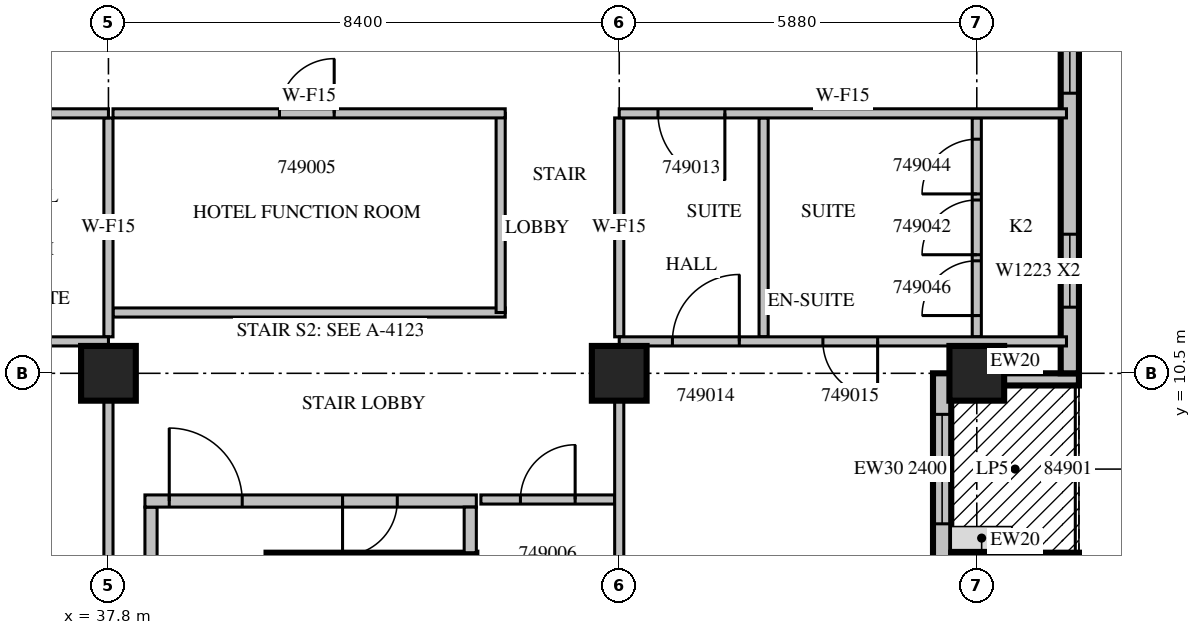
"""IFC4 building model, lengths in metres.
Left out: names, types, materials, properties, quantities, classifications, styles, units other than length and angle.
Written with IfcOpenShell. Run it as: python <this file> out.ifc"""

import sys

from ifc_helpers import new_model, si_unit, direction, frame, frame_2d, origin, origin_2d, place, context, subcontext, project, spatial, rectangle, extrude, source, transform, mapped, element, fill, save


model = new_model("IFC4")
c1 = context("Model", 3, precision=1e-05, world=origin(), true_north=direction((0.0, 1.0)))
c2 = subcontext(c1, "Body", "Model", "MODEL_VIEW")
j1 = project(units=[si_unit("LENGTHUNIT", "METRE"), si_unit("PLANEANGLEUNIT", "RADIAN")], contexts=[c1])
p1 = place(None, origin())
s1 = spatial("IfcSite", under=j1, at=p1, CompositionType="ELEMENT")
p2 = place(p1, origin())
s2 = spatial("IfcBuilding", under=s1, at=p2, CompositionType="ELEMENT")
p3 = place(p2, frame((0.0, 0.0, 219.6)))
s3 = spatial("IfcBuildingStorey", under=s2, at=p3, CompositionType="ELEMENT", Elevation=219.6)
m1 = source(origin(), c2, "Body", "SweptSolid", [
    extrude(rectangle(XDim=0.9, YDim=0.9, at=origin_2d()), origin(), (0.0, 0.0, 1.0), 3.8),
])
for number, where, z_axis, x_axis in (
    (1, (37.8, 10.5, 0.0), (0.0, 0.0, 1.0), (1.0, 0.0, 0.0)),
    (2, (46.2, 10.5, 0.0), (0.0, 0.0, 1.0), (1.0, 0.0, 0.0)),
    (3, (52.08, 10.5, 0.0), (0.0, 0.0, 1.0), (1.0, 0.0, 0.0)),
):
    element("IfcColumn", number, at=place(p3, frame(where, z_axis=z_axis, x_axis=x_axis)), inside=s3, PredefinedType="COLUMN", context=c2, shape_type="MappedRepresentation", body=[
        mapped(m1, transform((0.0, 0.0, 0.0), scale=1.0)),
    ])
p4 = place(p3, frame((51.51, 7.35, 0.0), z_axis=(0.0, 0.0, 1.0), x_axis=(0.0, 1.0, 0.0)))
e4 = element("IfcWall", 4, at=p4, inside=s3, PredefinedType="STANDARD", context=c2, shape_type="SweptSolid", body=[
    extrude(rectangle(XDim=3.15, YDim=0.3, at=frame_2d((1.575, 0.0))), origin(), (0.0, 0.0, 1.0), 2.4),
])
m2 = source(origin(), c2, "Body", "SweptSolid", [
    extrude(rectangle(XDim=1.8, YDim=2.4, at=frame_2d((0.9, 1.2))), frame((0.0, 0.16, 0.0), z_axis=(0.0, -1.0, 0.0), x_axis=(1.0, 0.0, 0.0)), (0.0, 0.0, 1.0), 0.32),
])
p5 = place(p4, frame((0.675, 0.0, 0.0)))
e5 = element("IfcOpeningElement", 5, at=p5, cuts=e4, PredefinedType="OPENING", context=c2, shape_type="MappedRepresentation", body=[
    mapped(m2, transform((0.0, 0.0, 0.0), scale=1.0)),
])
m3 = source(origin(), c2, "Body", "SweptSolid", [
    extrude(rectangle(XDim=2.1, YDim=0.2, at=frame_2d((1.05, 0.0))), origin(), (0.0, 0.0, 1.0), 3.4),
])
for number, where, z_axis, x_axis in (
    (6, (53.76, 7.45, 0.0), (0.0, 0.0, 1.0), (-1.0, 0.0, 0.0)),
    (7, (53.76, 10.4, 0.0), (0.0, 0.0, 1.0), (-1.0, 0.0, 0.0)),
):
    element("IfcWall", number, at=place(p3, frame(where, z_axis=z_axis, x_axis=x_axis)), inside=s3, PredefinedType="STANDARD", context=c2, shape_type="MappedRepresentation", body=[
        mapped(m3, transform((0.0, 0.0, 0.0), scale=1.0)),
    ])
m4 = source(origin(), c2, "Body", "SweptSolid", [
    extrude(rectangle(XDim=6.75, YDim=0.3, at=frame_2d((3.375, 0.0))), origin(), (0.0, 0.0, 1.0), 3.4),
])
p6 = place(p3, frame((53.61, 10.5, 0.0), z_axis=(0.0, 0.0, 1.0), x_axis=(0.0, 1.0, 0.0)))
e8 = element("IfcWall", 8, at=p6, inside=s3, PredefinedType="STANDARD", context=c2, shape_type="MappedRepresentation", body=[
    mapped(m4, transform((0.0, 0.0, 0.0), scale=1.0)),
])
m5 = source(origin(), c2, "Body", "SweptSolid", [
    extrude(rectangle(XDim=1.2, YDim=2.3, at=frame_2d((0.6, 1.15))), frame((0.0, 0.16, 0.0), z_axis=(0.0, -1.0, 0.0), x_axis=(1.0, 0.0, 0.0)), (0.0, 0.0, 1.0), 0.32),
])
p7 = place(p6, frame((1.087, 0.0, 0.6)))
e9 = element("IfcOpeningElement", 9, at=p7, cuts=e8, PredefinedType="OPENING", context=c2, shape_type="MappedRepresentation", body=[
    mapped(m5, transform((0.0, 0.0, 0.0), scale=1.0)),
])
p8 = place(p6, frame((4.606, 0.0, 0.6)))
e10 = element("IfcOpeningElement", 10, at=p8, cuts=e8, PredefinedType="OPENING", context=c2, shape_type="MappedRepresentation", body=[
    mapped(m5, transform((0.0, 0.0, 0.0), scale=1.0)),
])
m6 = source(origin(), c2, "Body", "SweptSolid", [
    extrude(rectangle(XDim=3.45, YDim=0.25, at=frame_2d((1.725, 0.0))), origin(), (0.0, 0.0, 1.0), 3.4),
])
p9 = place(p3, frame((40.4, 7.425, 0.0), z_axis=(0.0, 0.0, 1.0), x_axis=(1.0, 0.0, 0.0)))
e11 = element("IfcWall", 11, at=p9, inside=s3, PredefinedType="SOLIDWALL", context=c2, shape_type="MappedRepresentation", body=[
    mapped(m6, transform((0.0, 0.0, 0.0), scale=1.0)),
])
m7 = source(origin(), c2, "Body", "SweptSolid", [
    extrude(rectangle(XDim=8.0, YDim=0.2, at=frame_2d((4.0, 0.0))), origin(), (0.0, 0.0, 1.0), 3.4),
])
p10 = place(p3, frame((38.5, 0.3, 0.0), z_axis=(0.0, 0.0, 1.0), x_axis=(0.0, 1.0, 0.0)))
e12 = element("IfcWall", 12, at=p10, inside=s3, PredefinedType="PARTITIONING", context=c2, shape_type="MappedRepresentation", body=[
    mapped(m7, transform((0.0, 0.0, 0.0), scale=1.0)),
])
m8 = source(origin(), c2, "Body", "SweptSolid", [
    extrude(rectangle(XDim=5.45, YDim=0.2, at=frame_2d((2.725, 0.0))), origin(), (0.0, 0.0, 1.0), 3.4),
])
p11 = place(p3, frame((38.4, 8.4, 0.0), z_axis=(0.0, 0.0, 1.0), x_axis=(1.0, 0.0, 0.0)))
e13 = element("IfcWall", 13, at=p11, inside=s3, PredefinedType="PARTITIONING", context=c2, shape_type="MappedRepresentation", body=[
    mapped(m8, transform((0.0, 0.0, 0.0), scale=1.0)),
])
m9 = source(origin(), c2, "Body", "SweptSolid", [
    extrude(rectangle(XDim=1.2, YDim=2.1, at=frame_2d((0.6, 1.05))), frame((0.0, 0.11, 0.0), z_axis=(0.0, -1.0, 0.0), x_axis=(1.0, 0.0, 0.0)), (0.0, 0.0, 1.0), 0.22),
])
p12 = place(p11, frame((0.4, 0.0, 0.0)))
e14 = element("IfcOpeningElement", 14, at=p12, cuts=e13, PredefinedType="OPENING", context=c2, shape_type="MappedRepresentation", body=[
    mapped(m9, transform((0.0, 0.0, 0.0), scale=1.0)),
])
m10 = source(origin(), c2, "Body", "SweptSolid", [
    extrude(rectangle(XDim=0.9, YDim=2.1, at=frame_2d((0.45, 1.05))), frame((0.0, 0.11, 0.0), z_axis=(0.0, -1.0, 0.0), x_axis=(1.0, 0.0, 0.0)), (0.0, 0.0, 1.0), 0.22),
])
p13 = place(p11, frame((3.25, 0.0, 0.0)))
e15 = element("IfcOpeningElement", 15, at=p13, cuts=e13, PredefinedType="OPENING", context=c2, shape_type="MappedRepresentation", body=[
    mapped(m10, transform((0.0, 0.0, 0.0), scale=1.0)),
])
m11 = source(origin(), c2, "Body", "SweptSolid", [
    extrude(rectangle(XDim=0.75, YDim=0.2, at=frame_2d((0.375, 0.0))), origin(), (0.0, 0.0, 1.0), 3.4),
])
p14 = place(p3, frame((43.75, 7.55, 0.0), z_axis=(0.0, 0.0, 1.0), x_axis=(0.0, 1.0, 0.0)))
e16 = element("IfcWall", 16, at=p14, inside=s3, PredefinedType="PARTITIONING", context=c2, shape_type="MappedRepresentation", body=[
    mapped(m11, transform((0.0, 0.0, 0.0), scale=1.0)),
])
m12 = source(origin(), c2, "Body", "SweptSolid", [
    extrude(rectangle(XDim=6.45, YDim=0.15, at=frame_2d((3.225, 0.0))), origin(), (0.0, 0.0, 1.0), 3.4),
])
p15 = place(p3, frame((37.875, 11.5, 0.0), z_axis=(0.0, 0.0, 1.0), x_axis=(1.0, 0.0, 0.0)))
e17 = element("IfcWall", 17, at=p15, inside=s3, PredefinedType="PARTITIONING", context=c2, shape_type="MappedRepresentation", body=[
    mapped(m12, transform((0.0, 0.0, 0.0), scale=1.0)),
])
m13 = source(origin(), c2, "Body", "SweptSolid", [
    extrude(rectangle(XDim=3.275, YDim=0.15, at=frame_2d((1.637, 0.0))), origin(), (0.0, 0.0, 1.0), 3.4),
])
p16 = place(p3, frame((44.25, 11.5, 0.0), z_axis=(0.0, 0.0, 1.0), x_axis=(0.0, 1.0, 0.0)))
e18 = element("IfcWall", 18, at=p16, inside=s3, PredefinedType="PARTITIONING", context=c2, shape_type="MappedRepresentation", body=[
    mapped(m13, transform((0.0, 0.0, 0.0), scale=1.0)),
])
p17 = place(p3, frame((44.325, 14.775, 0.0), z_axis=(0.0, 0.0, 1.0), x_axis=(-1.0, 0.0, 0.0)))
e19 = element("IfcWall", 19, at=p17, inside=s3, PredefinedType="PARTITIONING", context=c2, shape_type="MappedRepresentation", body=[
    mapped(m12, transform((0.0, 0.0, 0.0), scale=1.0)),
])
m14 = source(origin(), c2, "Body", "SweptSolid", [
    extrude(rectangle(XDim=0.9, YDim=2.1, at=frame_2d((0.45, 1.05))), frame((0.0, 0.085, 0.0), z_axis=(0.0, -1.0, 0.0), x_axis=(1.0, 0.0, 0.0)), (0.0, 0.0, 1.0), 0.17),
])
p18 = place(p17, frame((2.812, 0.0, 0.0)))
e20 = element("IfcOpeningElement", 20, at=p18, cuts=e19, PredefinedType="OPENING", context=c2, shape_type="MappedRepresentation", body=[
    mapped(m14, transform((0.0, 0.0, 0.0), scale=1.0)),
])
m15 = source(origin(), c2, "Body", "SweptSolid", [
    extrude(rectangle(XDim=2.2, YDim=0.15, at=frame_2d((1.1, 0.0))), origin(), (0.0, 0.0, 1.0), 3.4),
])
p19 = place(p3, frame((46.125, 8.425, 0.0), z_axis=(0.0, 0.0, 1.0), x_axis=(-1.0, 0.0, 0.0)))
e21 = element("IfcWall", 21, at=p19, inside=s3, PredefinedType="PARTITIONING", context=c2, shape_type="MappedRepresentation", body=[
    mapped(m15, transform((0.0, 0.0, 0.0), scale=1.0)),
])
p20 = place(p19, frame((0.65, 0.0, 0.0)))
e22 = element("IfcOpeningElement", 22, at=p20, cuts=e21, PredefinedType="OPENING", context=c2, shape_type="MappedRepresentation", body=[
    mapped(m14, transform((0.0, 0.0, 0.0), scale=1.0)),
])
m16 = source(origin(), c2, "Body", "SweptSolid", [
    extrude(rectangle(XDim=9.152, YDim=0.15, at=frame_2d((4.576, 0.0))), origin(), (0.0, 0.0, 1.0), 3.4),
])
p21 = place(p3, frame((37.8, 0.899, 0.0), z_axis=(0.0, 0.0, 1.0), x_axis=(0.0, 1.0, 0.0)))
e23 = element("IfcWall", 23, at=p21, inside=s3, PredefinedType="PARTITIONING", context=c2, shape_type="MappedRepresentation", body=[
    mapped(m16, transform((0.0, 0.0, 0.0), scale=1.0)),
])
m17 = source(origin(), c2, "Body", "SweptSolid", [
    extrude(rectangle(XDim=3.6, YDim=0.15, at=frame_2d((1.8, 0.0))), origin(), (0.0, 0.0, 1.0), 3.4),
])
p22 = place(p3, frame((37.8, 11.1, 0.0), z_axis=(0.0, 0.0, 1.0), x_axis=(0.0, 1.0, 0.0)))
e24 = element("IfcWall", 24, at=p22, inside=s3, PredefinedType="PARTITIONING", context=c2, shape_type="MappedRepresentation", body=[
    mapped(m17, transform((0.0, 0.0, 0.0), scale=1.0)),
])
m18 = source(origin(), c2, "Body", "SweptSolid", [
    extrude(rectangle(XDim=8.4, YDim=0.15, at=frame_2d((4.2, 0.0))), origin(), (0.0, 0.0, 1.0), 3.4),
])
p23 = place(p3, frame((37.8, 11.025, 0.0), z_axis=(0.0, 0.0, 1.0), x_axis=(-1.0, 0.0, 0.0)))
e25 = element("IfcWall", 25, at=p23, inside=s3, PredefinedType="PARTITIONING", context=c2, shape_type="MappedRepresentation", body=[
    mapped(m18, transform((0.0, 0.0, 0.0), scale=1.0)),
])
p24 = place(p23, frame((7.025, 0.0, 0.0)))
e26 = element("IfcOpeningElement", 26, at=p24, cuts=e25, PredefinedType="OPENING", context=c2, shape_type="MappedRepresentation", body=[
    mapped(m14, transform((0.0, 0.0, 0.0), scale=1.0)),
])
p25 = place(p23, frame((5.013, 0.0, 0.0)))
e27 = element("IfcOpeningElement", 27, at=p25, cuts=e25, PredefinedType="OPENING", context=c2, shape_type="MappedRepresentation", body=[
    mapped(m14, transform((0.0, 0.0, 0.0), scale=1.0)),
])
m19 = source(origin(), c2, "Body", "SweptSolid", [
    extrude(rectangle(XDim=1.0, YDim=2.1, at=frame_2d((0.5, 1.05))), frame((0.0, 0.085, 0.0), z_axis=(0.0, -1.0, 0.0), x_axis=(1.0, 0.0, 0.0)), (0.0, 0.0, 1.0), 0.17),
])
p26 = place(p23, frame((2.9, 0.0, 0.0)))
e28 = element("IfcOpeningElement", 28, at=p26, cuts=e25, PredefinedType="OPENING", context=c2, shape_type="MappedRepresentation", body=[
    mapped(m19, transform((0.0, 0.0, 0.0), scale=1.0)),
])
p27 = place(p23, frame((1.087, 0.0, 0.0)))
e29 = element("IfcOpeningElement", 29, at=p27, cuts=e25, PredefinedType="OPENING", context=c2, shape_type="MappedRepresentation", body=[
    mapped(m14, transform((0.0, 0.0, 0.0), scale=1.0)),
])
p28 = place(p3, frame((48.574, 11.1, 0.0), z_axis=(0.0, 0.0, 1.0), x_axis=(0.0, 1.0, 0.0)))
e30 = element("IfcWall", 30, at=p28, inside=s3, PredefinedType="PARTITIONING", context=c2, shape_type="MappedRepresentation", body=[
    mapped(m17, transform((0.0, 0.0, 0.0), scale=1.0)),
])
p29 = place(p3, frame((52.08, 11.1, 0.0), z_axis=(0.0, 0.0, 1.0), x_axis=(0.0, 1.0, 0.0)))
e31 = element("IfcWall", 31, at=p29, inside=s3, PredefinedType="PARTITIONING", context=c2, shape_type="MappedRepresentation", body=[
    mapped(m17, transform((0.0, 0.0, 0.0), scale=1.0)),
])
p30 = place(p29, frame((1.35, 0.0, 0.0)))
e32 = element("IfcOpeningElement", 32, at=p30, cuts=e31, PredefinedType="OPENING", context=c2, shape_type="MappedRepresentation", body=[
    mapped(m14, transform((0.0, 0.0, 0.0), scale=1.0)),
])
p31 = place(p29, frame((2.35, 0.0, 0.0)))
e33 = element("IfcOpeningElement", 33, at=p31, cuts=e31, PredefinedType="OPENING", context=c2, shape_type="MappedRepresentation", body=[
    mapped(m14, transform((0.0, 0.0, 0.0), scale=1.0)),
])
p32 = place(p29, frame((0.35, 0.0, 0.0)))
e34 = element("IfcOpeningElement", 34, at=p32, cuts=e31, PredefinedType="OPENING", context=c2, shape_type="MappedRepresentation", body=[
    mapped(m14, transform((0.0, 0.0, 0.0), scale=1.0)),
])
p33 = place(p3, frame((46.2, 0.899, 0.0), z_axis=(0.0, 0.0, 1.0), x_axis=(0.0, 1.0, 0.0)))
e35 = element("IfcWall", 35, at=p33, inside=s3, PredefinedType="PARTITIONING", context=c2, shape_type="MappedRepresentation", body=[
    mapped(m16, transform((0.0, 0.0, 0.0), scale=1.0)),
])
p34 = place(p3, frame((46.2, 11.1, 0.0), z_axis=(0.0, 0.0, 1.0), x_axis=(0.0, 1.0, 0.0)))
e36 = element("IfcWall", 36, at=p34, inside=s3, PredefinedType="PARTITIONING", context=c2, shape_type="MappedRepresentation", body=[
    mapped(m17, transform((0.0, 0.0, 0.0), scale=1.0)),
])
m20 = source(origin(), c2, "Body", "SweptSolid", [
    extrude(rectangle(XDim=7.355, YDim=0.15, at=frame_2d((3.678, 0.0))), origin(), (0.0, 0.0, 1.0), 3.4),
])
p35 = place(p3, frame((53.555, 11.025, 0.0), z_axis=(0.0, 0.0, 1.0), x_axis=(-1.0, 0.0, 0.0)))
e37 = element("IfcWall", 37, at=p35, inside=s3, PredefinedType="PARTITIONING", context=c2, shape_type="MappedRepresentation", body=[
    mapped(m20, transform((0.0, 0.0, 0.0), scale=1.0)),
])
m21 = source(origin(), c2, "Body", "SweptSolid", [
    extrude(rectangle(XDim=1.1, YDim=2.1, at=frame_2d((0.55, 1.05))), frame((0.0, 0.085, 0.0), z_axis=(0.0, -1.0, 0.0), x_axis=(1.0, 0.0, 0.0)), (0.0, 0.0, 1.0), 0.17),
])
p36 = place(p35, frame((5.38, 0.0, 0.0)))
e38 = element("IfcOpeningElement", 38, at=p36, cuts=e37, PredefinedType="OPENING", context=c2, shape_type="MappedRepresentation", body=[
    mapped(m21, transform((0.0, 0.0, 0.0), scale=1.0)),
])
p37 = place(p35, frame((3.106, 0.0, 0.0)))
e39 = element("IfcOpeningElement", 39, at=p37, cuts=e37, PredefinedType="OPENING", context=c2, shape_type="MappedRepresentation", body=[
    mapped(m14, transform((0.0, 0.0, 0.0), scale=1.0)),
])
p38 = place(p3, frame((37.8, 14.775, 0.0), z_axis=(0.0, 0.0, 1.0), x_axis=(-1.0, 0.0, 0.0)))
e40 = element("IfcWall", 40, at=p38, inside=s3, PredefinedType="PARTITIONING", context=c2, shape_type="MappedRepresentation", body=[
    mapped(m18, transform((0.0, 0.0, 0.0), scale=1.0)),
])
p39 = place(p38, frame((7.112, 0.0, 0.0)))
e41 = element("IfcOpeningElement", 41, at=p39, cuts=e40, PredefinedType="OPENING", context=c2, shape_type="MappedRepresentation", body=[
    mapped(m19, transform((0.0, 0.0, 0.0), scale=1.0)),
])
p40 = place(p38, frame((2.95, 0.0, 0.0)))
e42 = element("IfcOpeningElement", 42, at=p40, cuts=e40, PredefinedType="OPENING", context=c2, shape_type="MappedRepresentation", body=[
    mapped(m19, transform((0.0, 0.0, 0.0), scale=1.0)),
])
p41 = place(p3, frame((53.555, 14.775, 0.0), z_axis=(0.0, 0.0, 1.0), x_axis=(-1.0, 0.0, 0.0)))
e43 = element("IfcWall", 43, at=p41, inside=s3, PredefinedType="PARTITIONING", context=c2, shape_type="MappedRepresentation", body=[
    mapped(m20, transform((0.0, 0.0, 0.0), scale=1.0)),
])
p42 = place(p41, frame((5.618, 0.0, 0.0)))
e44 = element("IfcOpeningElement", 44, at=p42, cuts=e43, PredefinedType="OPENING", context=c2, shape_type="MappedRepresentation", body=[
    mapped(m21, transform((0.0, 0.0, 0.0), scale=1.0)),
])
m22 = source(origin(), c2, "Body", "SweptSolid", [
    extrude(rectangle(XDim=1.8, YDim=2.4, at=frame_2d((0.9, 1.2))), frame((0.0, 0.025, 0.0), z_axis=(0.0, -1.0, 0.0), x_axis=(1.0, 0.0, 0.0)), (0.0, 0.0, 1.0), 0.05),
])
p43 = place(p5, origin())
e45 = element("IfcDoor", 45, at=p43, inside=s3, OperationType="SLIDING_TO_LEFT", PredefinedType="DOOR", context=c2, shape_type="MappedRepresentation", body=[
    mapped(m22, transform((0.0, 0.0, 0.0), scale=1.0)),
])
fill(e5, e45)
m23 = source(origin(), c2, "Body", "SweptSolid", [
    extrude(rectangle(XDim=1.2, YDim=2.3, at=frame_2d((0.6, 1.15))), frame((0.0, 0.03, 0.0), z_axis=(0.0, -1.0, 0.0), x_axis=(1.0, 0.0, 0.0)), (0.0, 0.0, 1.0), 0.06),
])
p44 = place(p7, origin())
e46 = element("IfcWindow", 46, at=p44, inside=s3, PartitioningType="SINGLE_PANEL", PredefinedType="WINDOW", context=c2, shape_type="MappedRepresentation", body=[
    mapped(m23, transform((0.0, 0.0, 0.0), scale=1.0)),
])
fill(e9, e46)
p45 = place(p8, origin())
e47 = element("IfcWindow", 47, at=p45, inside=s3, PartitioningType="SINGLE_PANEL", PredefinedType="WINDOW", context=c2, shape_type="MappedRepresentation", body=[
    mapped(m23, transform((0.0, 0.0, 0.0), scale=1.0)),
])
fill(e10, e47)
m24 = source(origin(), c2, "Body", "SweptSolid", [
    extrude(rectangle(XDim=1.2, YDim=2.1, at=frame_2d((0.6, 1.05))), frame((0.0, 0.025, 0.0), z_axis=(0.0, -1.0, 0.0), x_axis=(1.0, 0.0, 0.0)), (0.0, 0.0, 1.0), 0.05),
])
p46 = place(p12, origin())
e48 = element("IfcDoor", 48, at=p46, inside=s3, OperationType="SINGLE_SWING_LEFT", PredefinedType="DOOR", context=c2, shape_type="MappedRepresentation", body=[
    mapped(m24, transform((0.0, 0.0, 0.0), scale=1.0)),
])
fill(e14, e48)
m25 = source(origin(), c2, "Body", "SweptSolid", [
    extrude(rectangle(XDim=0.9, YDim=2.1, at=frame_2d((0.45, 1.05))), frame((0.0, 0.025, 0.0), z_axis=(0.0, -1.0, 0.0), x_axis=(1.0, 0.0, 0.0)), (0.0, 0.0, 1.0), 0.05),
])
p47 = place(p13, origin())
e49 = element("IfcDoor", 49, at=p47, inside=s3, OperationType="SINGLE_SWING_RIGHT", PredefinedType="DOOR", context=c2, shape_type="MappedRepresentation", body=[
    mapped(m25, transform((0.0, 0.0, 0.0), scale=1.0)),
])
fill(e15, e49)
p48 = place(p18, origin())
e50 = element("IfcDoor", 50, at=p48, inside=s3, OperationType="SINGLE_SWING_RIGHT", PredefinedType="DOOR", context=c2, shape_type="MappedRepresentation", body=[
    mapped(m25, transform((0.0, 0.0, 0.0), scale=1.0)),
])
fill(e20, e50)
p49 = place(p20, origin())
e51 = element("IfcDoor", 51, at=p49, inside=s3, OperationType="SINGLE_SWING_RIGHT", PredefinedType="DOOR", context=c2, shape_type="MappedRepresentation", body=[
    mapped(m25, transform((0.0, 0.0, 0.0), scale=1.0)),
])
fill(e22, e51)
m26 = source(origin(), c2, "Body", "SweptSolid", [
    extrude(rectangle(XDim=1.1, YDim=2.1, at=frame_2d((0.55, 1.05))), frame((0.0, 0.025, 0.0), z_axis=(0.0, -1.0, 0.0), x_axis=(1.0, 0.0, 0.0)), (0.0, 0.0, 1.0), 0.05),
])
p50 = place(p42, origin())
e52 = element("IfcDoor", 52, at=p50, inside=s3, OperationType="SINGLE_SWING_LEFT", PredefinedType="DOOR", context=c2, shape_type="MappedRepresentation", body=[
    mapped(m26, transform((0.0, 0.0, 0.0), scale=1.0)),
])
fill(e44, e52)
p51 = place(p36, origin())
e53 = element("IfcDoor", 53, at=p51, inside=s3, OperationType="SINGLE_SWING_RIGHT", PredefinedType="DOOR", context=c2, shape_type="MappedRepresentation", body=[
    mapped(m26, transform((0.0, 0.0, 0.0), scale=1.0)),
])
fill(e38, e53)
p52 = place(p37, origin())
e54 = element("IfcDoor", 54, at=p52, inside=s3, OperationType="SINGLE_SWING_LEFT", PredefinedType="DOOR", context=c2, shape_type="MappedRepresentation", body=[
    mapped(m25, transform((0.0, 0.0, 0.0), scale=1.0)),
])
fill(e39, e54)
p53 = place(p30, origin())
e55 = element("IfcDoor", 55, at=p53, inside=s3, OperationType="SINGLE_SWING_LEFT", PredefinedType="DOOR", context=c2, shape_type="MappedRepresentation", body=[
    mapped(m25, transform((0.0, 0.0, 0.0), scale=1.0)),
])
fill(e32, e55)
p54 = place(p31, origin())
e56 = element("IfcDoor", 56, at=p54, inside=s3, OperationType="SINGLE_SWING_LEFT", PredefinedType="DOOR", context=c2, shape_type="MappedRepresentation", body=[
    mapped(m25, transform((0.0, 0.0, 0.0), scale=1.0)),
])
fill(e33, e56)
p55 = place(p32, origin())
e57 = element("IfcDoor", 57, at=p55, inside=s3, OperationType="SINGLE_SWING_LEFT", PredefinedType="DOOR", context=c2, shape_type="MappedRepresentation", body=[
    mapped(m25, transform((0.0, 0.0, 0.0), scale=1.0)),
])
fill(e34, e57)
save(model, sys.argv[1])
